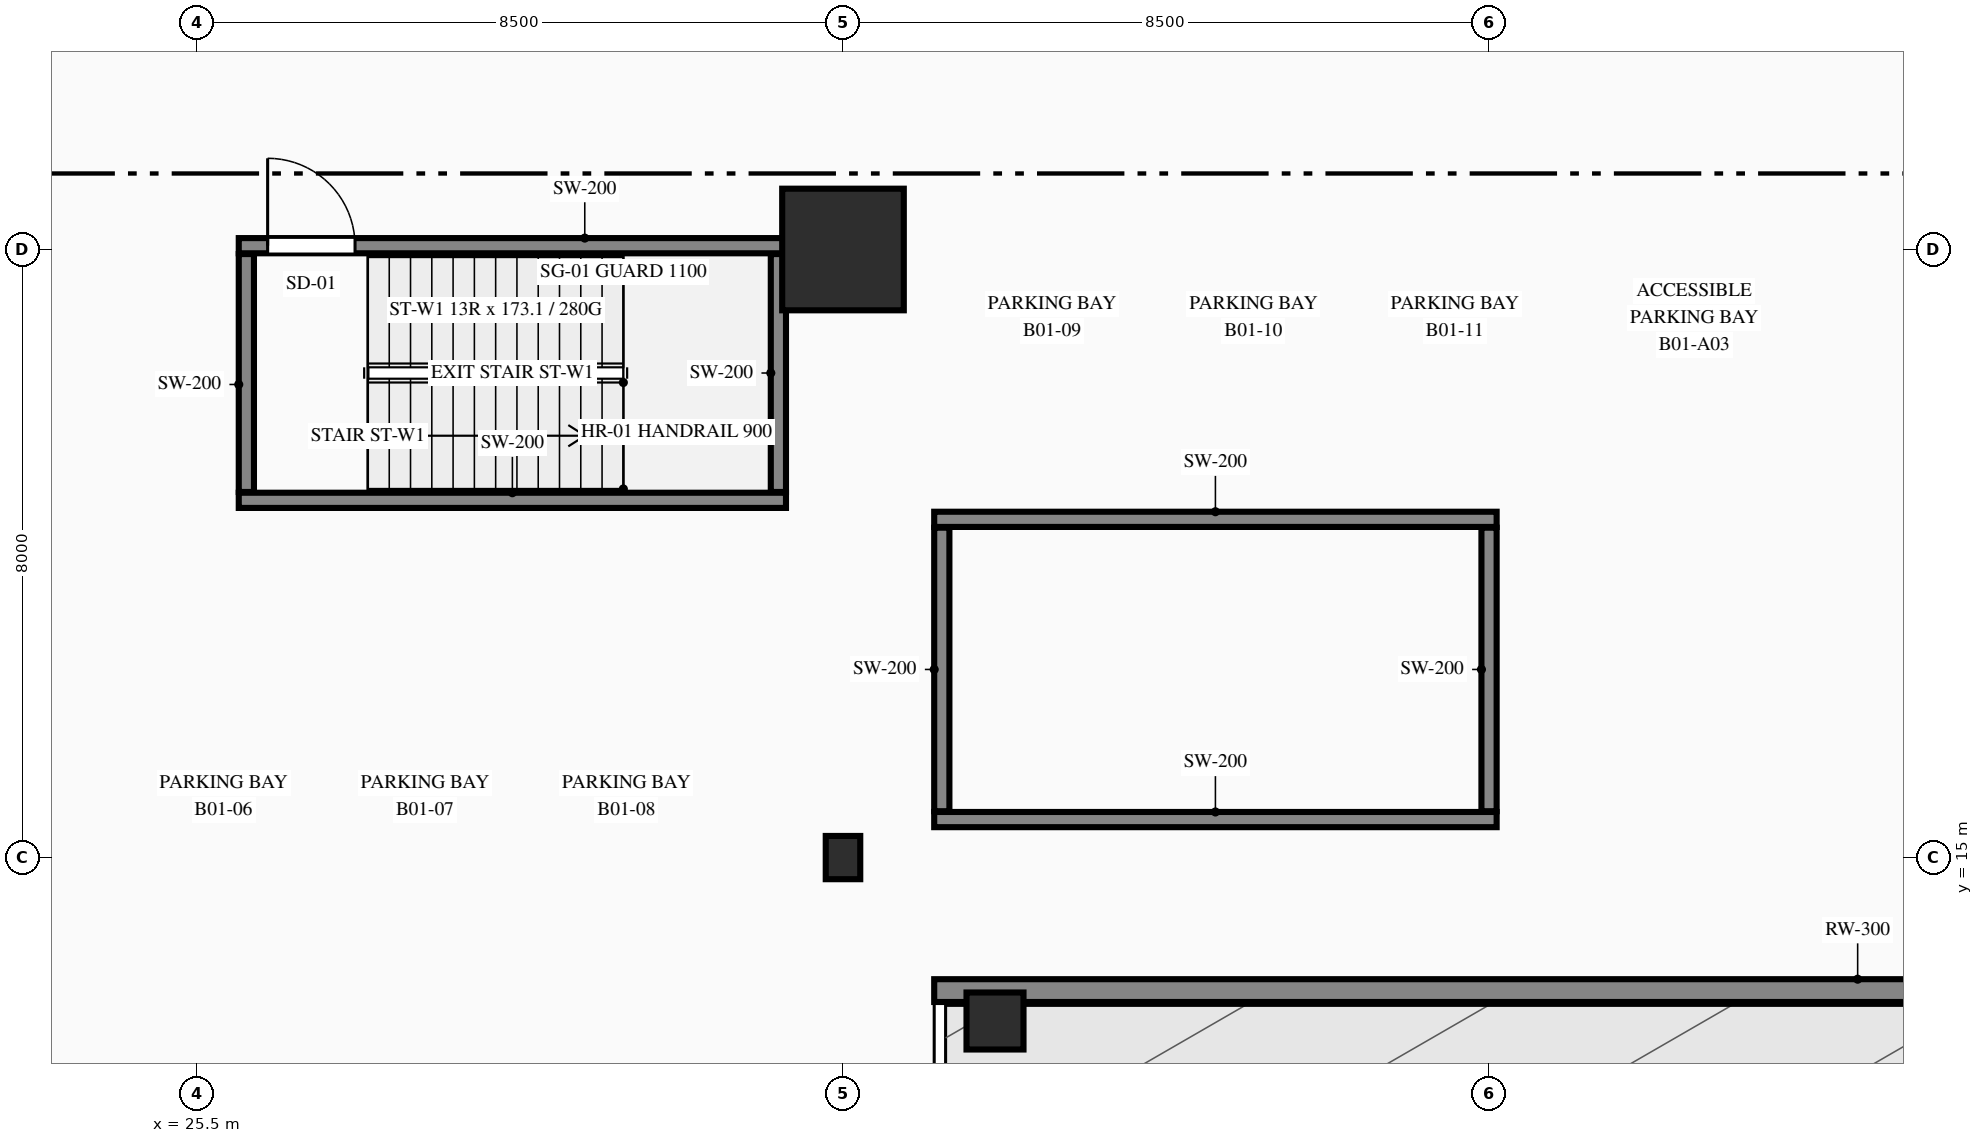
"""IFC4 building model, lengths in metres.
Left out: names, types, materials, properties, quantities, classifications, styles, units other than length and angle.
Written with IfcOpenShell. Run it as: python <this file> out.ifc"""

import sys

from ifc_helpers import new_model, si_unit, direction, frame, frame_2d, origin, origin_2d, place, context, subcontext, project, spatial, rectangle, i_section, extrude, element, fill, save


model = new_model("IFC4")
c1 = context("Model", 3, precision=1e-05, world=origin(), true_north=direction((0.0, 1.0)))
c2 = subcontext(c1, "Body", "Model", "MODEL_VIEW")
j1 = project(units=[si_unit("LENGTHUNIT", "METRE"), si_unit("PLANEANGLEUNIT", "RADIAN")], contexts=[c1])
p1 = place(None, origin())
s1 = spatial("IfcSite", under=j1, at=p1, CompositionType="ELEMENT")
p2 = place(p1, origin())
s2 = spatial("IfcBuilding", under=s1, at=p2, CompositionType="ELEMENT")
p3 = place(p2, frame((0.0, 0.0, -4.5)))
s3 = spatial("IfcBuildingStorey", under=s2, at=p3, CompositionType="ELEMENT", Elevation=-4.5)
p4 = place(p3, frame((26.05, 19.7, 0.0), z_axis=(0.0, 0.0, 1.0), x_axis=(1.0, 0.0, 0.0)))
e1 = element("IfcWall", 1, at=p4, inside=s3, PredefinedType="SHEAR", context=c2, shape_type="SweptSolid", body=[
    extrude(rectangle(XDim=7.2, YDim=0.2, at=frame_2d((3.6, 0.0))), origin(), (0.0, 0.0, 1.0), 4.5),
])
p5 = place(p3, frame((26.05, 23.05, 0.0), z_axis=(0.0, 0.0, 1.0), x_axis=(1.0, 0.0, 0.0)))
e2 = element("IfcWall", 2, at=p5, inside=s3, PredefinedType="SHEAR", context=c2, shape_type="SweptSolid", body=[
    extrude(rectangle(XDim=7.2, YDim=0.2, at=frame_2d((3.6, 0.0))), origin(), (0.0, 0.0, 1.0), 4.5),
])
p6 = place(p5, frame((0.38, 0.0, 0.0)))
e3 = element("IfcOpeningElement", 3, at=p6, cuts=e2, PredefinedType="OPENING", context=c2, shape_type="SweptSolid", body=[
    extrude(rectangle(XDim=1.15, YDim=2.2, at=frame_2d((0.575, 1.1))), frame((0.0, 0.11, 0.0), z_axis=(0.0, -1.0, 0.0), x_axis=(1.0, 0.0, 0.0)), (0.0, 0.0, 1.0), 0.22),
])
for number, where, z_axis, x_axis in (
    (4, (26.15, 19.81, 0.0), (0.0, 0.0, 1.0), (0.0, 1.0, 0.0)),
    (5, (33.15, 19.81, 0.0), (0.0, 0.0, 1.0), (0.0, 1.0, 0.0)),
):
    element("IfcWall", number, at=place(p3, frame(where, z_axis=z_axis, x_axis=x_axis)), inside=s3, PredefinedType="SHEAR", context=c2, shape_type="SweptSolid", body=[
        extrude(rectangle(XDim=3.13, YDim=0.2, at=frame_2d((1.565, 0.0))), origin(), (0.0, 0.0, 1.0), 4.5),
    ])
for number, where, z_axis, x_axis in (
    (6, (35.2, 15.5, 0.0), (0.0, 0.0, 1.0), (1.0, 0.0, 0.0)),
    (7, (35.2, 19.45, 0.0), (0.0, 0.0, 1.0), (1.0, 0.0, 0.0)),
):
    element("IfcWall", number, at=place(p3, frame(where, z_axis=z_axis, x_axis=x_axis)), inside=s3, PredefinedType="SHEAR", context=c2, shape_type="SweptSolid", body=[
        extrude(rectangle(XDim=7.4, YDim=0.2, at=frame_2d((3.7, 0.0))), origin(), (0.0, 0.0, 1.0), 4.5),
    ])
for number, where, z_axis, x_axis in (
    (8, (35.3, 15.61, 0.0), (0.0, 0.0, 1.0), (0.0, 1.0, 0.0)),
    (9, (42.5, 15.61, 0.0), (0.0, 0.0, 1.0), (0.0, 1.0, 0.0)),
):
    element("IfcWall", number, at=place(p3, frame(where, z_axis=z_axis, x_axis=x_axis)), inside=s3, PredefinedType="SHEAR", context=c2, shape_type="SweptSolid", body=[
        extrude(rectangle(XDim=3.73, YDim=0.2, at=frame_2d((1.865, 0.0))), origin(), (0.0, 0.0, 1.0), 4.5),
    ])
p7 = place(p3, frame((34.0, 15.0, 0.0), z_axis=(0.0, 0.0, 1.0), x_axis=(1.0, 0.0, 0.0)))
e10 = element("IfcColumn", 10, at=p7, inside=s3, PredefinedType="COLUMN", context=c2, shape_type="SweptSolid", body=[
    extrude(i_section(OverallWidth=0.454, OverallDepth=0.569, WebThickness=0.078, FlangeThickness=0.08, FilletRadius=0.015, at=origin_2d()), origin(), (0.0, 0.0, 1.0), 4.5),
])
p8 = place(p3, frame((34.0, 23.0, 0.0), z_axis=(0.0, 0.0, 1.0), x_axis=(1.0, 0.0, 0.0)))
e11 = element("IfcColumn", 11, at=p8, inside=s3, PredefinedType="COLUMN", context=c2, shape_type="SweptSolid", body=[
    extrude(rectangle(XDim=1.6, YDim=1.6, at=origin_2d()), origin(), (0.0, 0.0, 1.0), 4.5),
])
p9 = place(p3, frame((36.0, 12.85, 0.0), z_axis=(0.0, 0.0, 1.0), x_axis=(1.0, 0.0, 0.0)))
e12 = element("IfcColumn", 12, at=p9, inside=s3, PredefinedType="COLUMN", context=c2, shape_type="SweptSolid", body=[
    extrude(rectangle(XDim=0.75, YDim=0.75, at=origin_2d()), origin(), (0.0, 0.0, 1.0), 4.2),
])
p10 = place(p3, frame((35.2, 13.25, 0.0), z_axis=(0.0, 0.0, 1.0), x_axis=(1.0, 0.0, 0.0)))
e13 = element("IfcWall", 13, at=p10, inside=s3, PredefinedType="SOLIDWALL", context=c2, shape_type="SweptSolid", body=[
    extrude(rectangle(XDim=24.3, YDim=0.3, at=frame_2d((12.15, 0.0))), origin(), (0.0, 0.0, 1.0), 4.5),
])
p11 = place(p6, origin())
e14 = element("IfcDoor", 14, at=p11, inside=s3, OperationType="SINGLE_SWING_LEFT", PredefinedType="DOOR", context=c2, shape_type="SweptSolid", body=[
    extrude(rectangle(XDim=1.15, YDim=2.2, at=frame_2d((0.575, 1.1))), frame((0.0, 0.025, 0.0), z_axis=(0.0, -1.0, 0.0), x_axis=(1.0, 0.0, 0.0)), (0.0, 0.0, 1.0), 0.05),
])
fill(e3, e14)
save(model, sys.argv[1])
